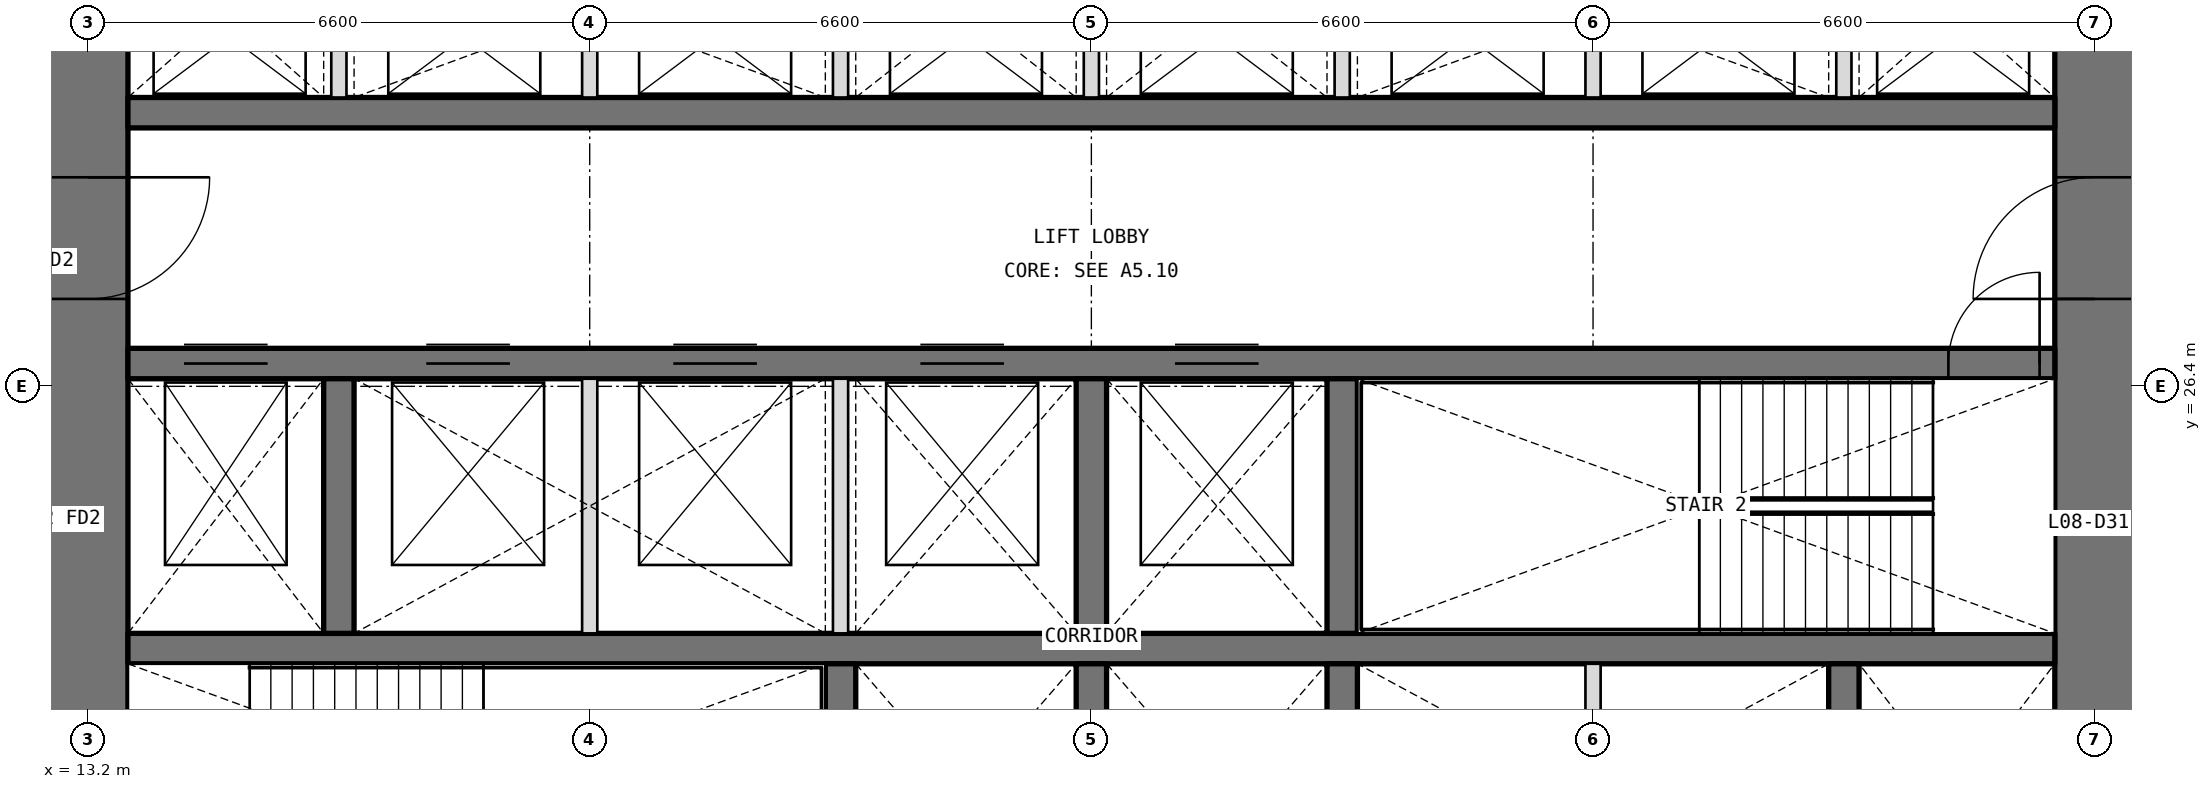
"""IFC4 building model, lengths in metres.
Left out: names, types, materials, properties, quantities, classifications, styles, units other than length and angle.
Written with IfcOpenShell. Run it as: python <this file> out.ifc"""

import sys

from ifc_helpers import new_model, si_unit, direction, frame, frame_2d, origin, place, context, subcontext, project, spatial, rectangle, extrude, element, fill, save


model = new_model("IFC4")
c1 = context("Model", 3, precision=1e-05, world=origin(), true_north=direction((0.0, 1.0)))
c2 = subcontext(c1, "Body", "Model", "MODEL_VIEW")
j1 = project(units=[si_unit("LENGTHUNIT", "METRE"), si_unit("PLANEANGLEUNIT", "RADIAN")], contexts=[c1])
p1 = place(None, origin())
s1 = spatial("IfcSite", under=j1, at=p1, CompositionType="ELEMENT")
p2 = place(p1, origin())
s2 = spatial("IfcBuilding", under=s1, at=p2, CompositionType="ELEMENT")
p3 = place(p2, frame((0.0, 0.0, 38.1)))
s3 = spatial("IfcBuildingStorey", under=s2, at=p3, CompositionType="ELEMENT", Elevation=38.1)
p4 = place(p3, frame((39.6, 13.725, 0.0), z_axis=(0.0, 0.0, 1.0), x_axis=(0.0, 1.0, 0.0)))
e1 = element("IfcWall", 1, at=p4, inside=s3, PredefinedType="SHEAR", context=c2, shape_type="SweptSolid", body=[
    extrude(rectangle(XDim=18.75, YDim=1.05, at=frame_2d((9.375, 0.0))), origin(), (0.0, 0.0, 1.0), 4.2),
])
p5 = place(p4, frame((3.025, 0.0, 0.0)))
e2 = element("IfcOpeningElement", 2, at=p5, cuts=e1, PredefinedType="OPENING", context=c2, shape_type="SweptSolid", body=[
    extrude(rectangle(XDim=1.6, YDim=2.1, at=frame_2d((0.8, 1.05))), frame((0.0, 0.535, 0.0), z_axis=(0.0, -1.0, 0.0), x_axis=(1.0, 0.0, 0.0)), (0.0, 0.0, 1.0), 1.07),
])
p6 = place(p4, frame((13.825, 0.0, 0.0)))
e3 = element("IfcOpeningElement", 3, at=p6, cuts=e1, PredefinedType="OPENING", context=c2, shape_type="SweptSolid", body=[
    extrude(rectangle(XDim=1.6, YDim=2.1, at=frame_2d((0.8, 1.05))), frame((0.0, 0.535, 0.0), z_axis=(0.0, -1.0, 0.0), x_axis=(1.0, 0.0, 0.0)), (0.0, 0.0, 1.0), 1.07),
])
p7 = place(p3, frame((13.2, 32.475, 0.0), z_axis=(0.0, 0.0, 1.0), x_axis=(0.0, -1.0, 0.0)))
e4 = element("IfcWall", 4, at=p7, inside=s3, PredefinedType="SHEAR", context=c2, shape_type="SweptSolid", body=[
    extrude(rectangle(XDim=18.75, YDim=1.05, at=frame_2d((9.375, 0.0))), origin(), (0.0, 0.0, 1.0), 4.2),
])
p8 = place(p7, frame((14.125, 0.0, 0.0)))
e5 = element("IfcOpeningElement", 5, at=p8, cuts=e4, PredefinedType="OPENING", context=c2, shape_type="SweptSolid", body=[
    extrude(rectangle(XDim=1.6, YDim=2.1, at=frame_2d((0.8, 1.05))), frame((0.0, 0.535, 0.0), z_axis=(0.0, -1.0, 0.0), x_axis=(1.0, 0.0, 0.0)), (0.0, 0.0, 1.0), 1.07),
])
p9 = place(p7, frame((3.325, 0.0, 0.0)))
e6 = element("IfcOpeningElement", 6, at=p9, cuts=e4, PredefinedType="OPENING", context=c2, shape_type="SweptSolid", body=[
    extrude(rectangle(XDim=1.6, YDim=2.1, at=frame_2d((0.8, 1.05))), frame((0.0, 0.535, 0.0), z_axis=(0.0, -1.0, 0.0), x_axis=(1.0, 0.0, 0.0)), (0.0, 0.0, 1.0), 1.07),
])
p10 = place(p3, frame((13.725, 22.95, 0.0), z_axis=(0.0, 0.0, 1.0), x_axis=(1.0, 0.0, 0.0)))
e7 = element("IfcWall", 7, at=p10, inside=s3, PredefinedType="SHEAR", context=c2, shape_type="SweptSolid", body=[
    extrude(rectangle(XDim=25.35, YDim=0.4, at=frame_2d((12.675, 0.0))), origin(), (0.0, 0.0, 1.0), 4.2),
])
p11 = place(p3, frame((13.725, 26.7, 0.0), z_axis=(0.0, 0.0, 1.0), x_axis=(1.0, 0.0, 0.0)))
e8 = element("IfcWall", 8, at=p11, inside=s3, PredefinedType="SHEAR", context=c2, shape_type="SweptSolid", body=[
    extrude(rectangle(XDim=25.35, YDim=0.4, at=frame_2d((12.675, 0.0))), origin(), (0.0, 0.0, 1.0), 4.2),
])
p12 = place(p11, frame((23.95, 0.0, 0.0)))
e9 = element("IfcOpeningElement", 9, at=p12, cuts=e8, PredefinedType="OPENING", context=c2, shape_type="SweptSolid", body=[
    extrude(rectangle(XDim=1.2, YDim=2.1, at=frame_2d((0.6, 1.05))), frame((0.0, 0.21, 0.0), z_axis=(0.0, -1.0, 0.0), x_axis=(1.0, 0.0, 0.0)), (0.0, 0.0, 1.0), 0.42),
])
p13 = place(p11, frame((0.738, 0.0, 0.0)))
e10 = element("IfcOpeningElement", 10, at=p13, cuts=e8, PredefinedType="OPENING", context=c2, shape_type="SweptSolid", body=[
    extrude(rectangle(XDim=1.1, YDim=2.1, at=frame_2d((0.55, 1.05))), frame((0.0, 0.21, 0.0), z_axis=(0.0, -1.0, 0.0), x_axis=(1.0, 0.0, 0.0)), (0.0, 0.0, 1.0), 0.42),
])
p14 = place(p11, frame((3.925, 0.0, 0.0)))
e11 = element("IfcOpeningElement", 11, at=p14, cuts=e8, PredefinedType="OPENING", context=c2, shape_type="SweptSolid", body=[
    extrude(rectangle(XDim=1.1, YDim=2.1, at=frame_2d((0.55, 1.05))), frame((0.0, 0.21, 0.0), z_axis=(0.0, -1.0, 0.0), x_axis=(1.0, 0.0, 0.0)), (0.0, 0.0, 1.0), 0.42),
])
p15 = place(p11, frame((7.175, 0.0, 0.0)))
e12 = element("IfcOpeningElement", 12, at=p15, cuts=e8, PredefinedType="OPENING", context=c2, shape_type="SweptSolid", body=[
    extrude(rectangle(XDim=1.1, YDim=2.1, at=frame_2d((0.55, 1.05))), frame((0.0, 0.21, 0.0), z_axis=(0.0, -1.0, 0.0), x_axis=(1.0, 0.0, 0.0)), (0.0, 0.0, 1.0), 0.42),
])
p16 = place(p11, frame((10.425, 0.0, 0.0)))
e13 = element("IfcOpeningElement", 13, at=p16, cuts=e8, PredefinedType="OPENING", context=c2, shape_type="SweptSolid", body=[
    extrude(rectangle(XDim=1.1, YDim=2.1, at=frame_2d((0.55, 1.05))), frame((0.0, 0.21, 0.0), z_axis=(0.0, -1.0, 0.0), x_axis=(1.0, 0.0, 0.0)), (0.0, 0.0, 1.0), 0.42),
])
p17 = place(p11, frame((13.775, 0.0, 0.0)))
e14 = element("IfcOpeningElement", 14, at=p17, cuts=e8, PredefinedType="OPENING", context=c2, shape_type="SweptSolid", body=[
    extrude(rectangle(XDim=1.1, YDim=2.1, at=frame_2d((0.55, 1.05))), frame((0.0, 0.21, 0.0), z_axis=(0.0, -1.0, 0.0), x_axis=(1.0, 0.0, 0.0)), (0.0, 0.0, 1.0), 0.42),
])
p18 = place(p3, frame((13.725, 30.0, 0.0), z_axis=(0.0, 0.0, 1.0), x_axis=(1.0, 0.0, 0.0)))
e15 = element("IfcWall", 15, at=p18, inside=s3, PredefinedType="SHEAR", context=c2, shape_type="SweptSolid", body=[
    extrude(rectangle(XDim=25.35, YDim=0.4, at=frame_2d((12.675, 0.0))), origin(), (0.0, 0.0, 1.0), 4.2),
])
for number, where, z_axis, x_axis in (
    (16, (23.1, 19.4, 0.0), (0.0, 0.0, 1.0), (0.0, 1.0, 0.0)),
    (17, (26.4, 19.4, 0.0), (0.0, 0.0, 1.0), (0.0, 1.0, 0.0)),
    (18, (29.7, 19.4, 0.0), (0.0, 0.0, 1.0), (0.0, 1.0, 0.0)),
    (19, (36.3, 19.4, 0.0), (0.0, 0.0, 1.0), (0.0, 1.0, 0.0)),
    (20, (16.5, 23.15, 0.0), (0.0, 0.0, 1.0), (0.0, 1.0, 0.0)),
    (21, (26.4, 23.15, 0.0), (0.0, 0.0, 1.0), (0.0, 1.0, 0.0)),
    (22, (29.7, 23.15, 0.0), (0.0, 0.0, 1.0), (0.0, 1.0, 0.0)),
):
    element("IfcWall", number, at=place(p3, frame(where, z_axis=z_axis, x_axis=x_axis)), inside=s3, PredefinedType="SHEAR", context=c2, shape_type="SweptSolid", body=[
        extrude(rectangle(XDim=3.35, YDim=0.4, at=frame_2d((1.675, 0.0))), origin(), (0.0, 0.0, 1.0), 4.2),
    ])
for number, where, z_axis, x_axis in (
    (23, (16.5, 30.2, 0.0), (0.0, 0.0, 1.0), (0.0, 1.0, 0.0)),
    (24, (19.8, 30.2, 0.0), (0.0, 0.0, 1.0), (0.0, 1.0, 0.0)),
    (25, (23.1, 30.2, 0.0), (0.0, 0.0, 1.0), (0.0, 1.0, 0.0)),
    (26, (26.4, 30.2, 0.0), (0.0, 0.0, 1.0), (0.0, 1.0, 0.0)),
    (27, (29.7, 30.2, 0.0), (0.0, 0.0, 1.0), (0.0, 1.0, 0.0)),
    (28, (33.0, 30.2, 0.0), (0.0, 0.0, 1.0), (0.0, 1.0, 0.0)),
    (29, (36.3, 30.2, 0.0), (0.0, 0.0, 1.0), (0.0, 1.0, 0.0)),
):
    element("IfcWall", number, at=place(p3, frame(where, z_axis=z_axis, x_axis=x_axis)), inside=s3, PredefinedType="PARTITIONING", context=c2, shape_type="SweptSolid", body=[
        extrude(rectangle(XDim=2.275, YDim=0.2, at=frame_2d((1.138, 0.0))), origin(), (0.0, 0.0, 1.0), 4.2),
    ])
for number, where, z_axis, x_axis in (
    (30, (33.0, 19.4, 0.0), (0.0, 0.0, 1.0), (0.0, 1.0, 0.0)),
    (31, (19.8, 23.15, 0.0), (0.0, 0.0, 1.0), (0.0, 1.0, 0.0)),
    (32, (23.1, 23.15, 0.0), (0.0, 0.0, 1.0), (0.0, 1.0, 0.0)),
):
    element("IfcWall", number, at=place(p3, frame(where, z_axis=z_axis, x_axis=x_axis)), inside=s3, PredefinedType="PARTITIONING", context=c2, shape_type="SweptSolid", body=[
        extrude(rectangle(XDim=3.35, YDim=0.2, at=frame_2d((1.675, 0.0))), origin(), (0.0, 0.0, 1.0), 4.2),
    ])
p19 = place(p12, origin())
e33 = element("IfcDoor", 33, at=p19, inside=s3, OperationType="SINGLE_SWING_RIGHT", PredefinedType="DOOR", context=c2, shape_type="SweptSolid", body=[
    extrude(rectangle(XDim=1.2, YDim=2.1, at=frame_2d((0.6, 1.05))), frame((0.0, 0.025, 0.0), z_axis=(0.0, -1.0, 0.0), x_axis=(1.0, 0.0, 0.0)), (0.0, 0.0, 1.0), 0.05),
])
fill(e9, e33)
p20 = place(p9, origin())
e34 = element("IfcDoor", 34, at=p20, inside=s3, OperationType="DOUBLE_DOOR_DOUBLE_SWING", PredefinedType="DOOR", context=c2, shape_type="SweptSolid", body=[
    extrude(rectangle(XDim=1.6, YDim=2.1, at=frame_2d((0.8, 1.05))), frame((0.0, 0.025, 0.0), z_axis=(0.0, -1.0, 0.0), x_axis=(1.0, 0.0, 0.0)), (0.0, 0.0, 1.0), 0.05),
])
fill(e6, e34)
p21 = place(p6, origin())
e35 = element("IfcDoor", 35, at=p21, inside=s3, OperationType="DOUBLE_DOOR_DOUBLE_SWING", PredefinedType="DOOR", context=c2, shape_type="SweptSolid", body=[
    extrude(rectangle(XDim=1.6, YDim=2.1, at=frame_2d((0.8, 1.05))), frame((0.0, 0.025, 0.0), z_axis=(0.0, -1.0, 0.0), x_axis=(1.0, 0.0, 0.0)), (0.0, 0.0, 1.0), 0.05),
])
fill(e3, e35)
p22 = place(p13, origin())
e36 = element("IfcDoor", 36, at=p22, inside=s3, OperationType="DOUBLE_DOOR_SLIDING", PredefinedType="DOOR", context=c2, shape_type="SweptSolid", body=[
    extrude(rectangle(XDim=1.1, YDim=2.1, at=frame_2d((0.55, 1.05))), frame((0.0, 0.025, 0.0), z_axis=(0.0, -1.0, 0.0), x_axis=(1.0, 0.0, 0.0)), (0.0, 0.0, 1.0), 0.05),
])
fill(e10, e36)
p23 = place(p14, origin())
e37 = element("IfcDoor", 37, at=p23, inside=s3, OperationType="DOUBLE_DOOR_SLIDING", PredefinedType="DOOR", context=c2, shape_type="SweptSolid", body=[
    extrude(rectangle(XDim=1.1, YDim=2.1, at=frame_2d((0.55, 1.05))), frame((0.0, 0.025, 0.0), z_axis=(0.0, -1.0, 0.0), x_axis=(1.0, 0.0, 0.0)), (0.0, 0.0, 1.0), 0.05),
])
fill(e11, e37)
p24 = place(p15, origin())
e38 = element("IfcDoor", 38, at=p24, inside=s3, OperationType="DOUBLE_DOOR_SLIDING", PredefinedType="DOOR", context=c2, shape_type="SweptSolid", body=[
    extrude(rectangle(XDim=1.1, YDim=2.1, at=frame_2d((0.55, 1.05))), frame((0.0, 0.025, 0.0), z_axis=(0.0, -1.0, 0.0), x_axis=(1.0, 0.0, 0.0)), (0.0, 0.0, 1.0), 0.05),
])
fill(e12, e38)
p25 = place(p16, origin())
e39 = element("IfcDoor", 39, at=p25, inside=s3, OperationType="DOUBLE_DOOR_SLIDING", PredefinedType="DOOR", context=c2, shape_type="SweptSolid", body=[
    extrude(rectangle(XDim=1.1, YDim=2.1, at=frame_2d((0.55, 1.05))), frame((0.0, 0.025, 0.0), z_axis=(0.0, -1.0, 0.0), x_axis=(1.0, 0.0, 0.0)), (0.0, 0.0, 1.0), 0.05),
])
fill(e13, e39)
p26 = place(p17, origin())
e40 = element("IfcDoor", 40, at=p26, inside=s3, OperationType="DOUBLE_DOOR_SLIDING", PredefinedType="DOOR", context=c2, shape_type="SweptSolid", body=[
    extrude(rectangle(XDim=1.1, YDim=2.1, at=frame_2d((0.55, 1.05))), frame((0.0, 0.025, 0.0), z_axis=(0.0, -1.0, 0.0), x_axis=(1.0, 0.0, 0.0)), (0.0, 0.0, 1.0), 0.05),
])
fill(e14, e40)
save(model, sys.argv[1])
